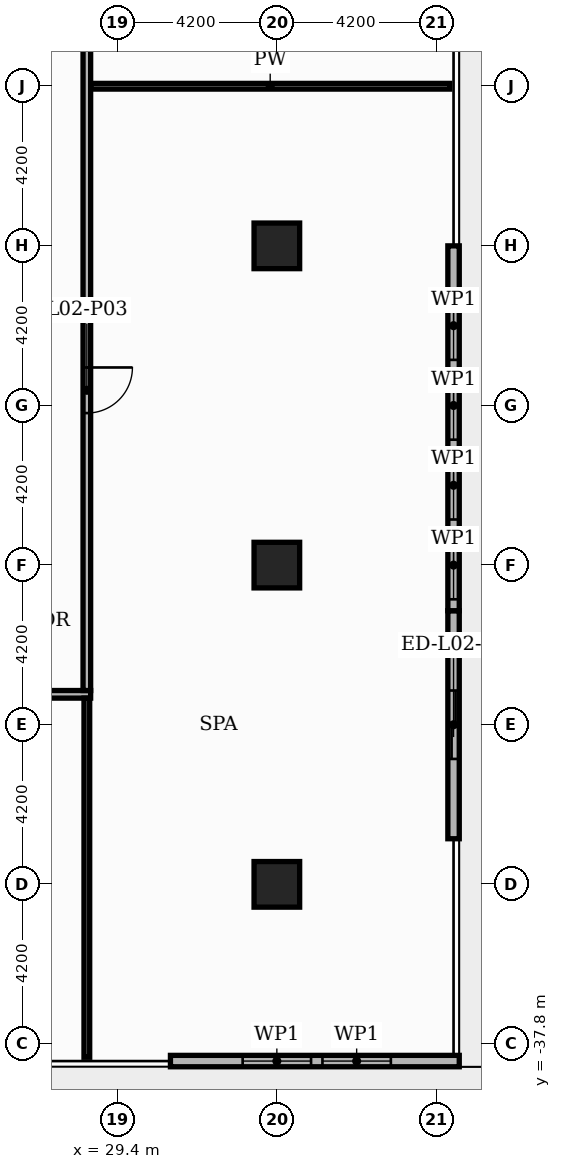
"""IFC4 building model, lengths in metres.
Left out: names, types, materials, properties, quantities, classifications, styles, units other than length and angle.
Written with IfcOpenShell. Run it as: python <this file> out.ifc"""

import sys

from ifc_helpers import new_model, si_unit, direction, frame, frame_2d, origin, origin_2d, place, context, subcontext, project, spatial, rectangle, extrude, element, fill, save


model = new_model("IFC4")
c1 = context("Model", 3, precision=1e-05, world=origin(), true_north=direction((0.0, 1.0)))
c2 = subcontext(c1, "Body", "Model", "MODEL_VIEW")
j1 = project(units=[si_unit("LENGTHUNIT", "METRE"), si_unit("PLANEANGLEUNIT", "RADIAN")], contexts=[c1])
p1 = place(None, origin())
s1 = spatial("IfcSite", under=j1, at=p1, CompositionType="ELEMENT")
p2 = place(p1, origin())
s2 = spatial("IfcBuilding", under=s1, at=p2, CompositionType="ELEMENT")
p3 = place(p2, frame((0.0, 0.0, 12.0)))
s3 = spatial("IfcBuildingStorey", under=s2, at=p3, CompositionType="ELEMENT", Elevation=12.0)
for number, where, z_axis, x_axis in (
    (1, (33.6, -16.8, 0.0), (0.0, 0.0, 1.0), (1.0, 0.0, 0.0)),
    (2, (33.6, -25.2, 0.0), (0.0, 0.0, 1.0), (1.0, 0.0, 0.0)),
    (3, (33.6, -33.6, 0.0), (0.0, 0.0, 1.0), (1.0, 0.0, 0.0)),
):
    element("IfcColumn", number, at=place(p3, frame(where, z_axis=z_axis, x_axis=x_axis)), inside=s3, PredefinedType="COLUMN", context=c2, shape_type="SweptSolid", body=[
        extrude(rectangle(XDim=1.2, YDim=1.2, at=origin_2d()), origin(), (0.0, 0.0, 1.0), 4.8),
    ])
p4 = place(p3, frame((30.8, -38.25, 0.0), z_axis=(0.0, 0.0, 1.0), x_axis=(1.0, 0.0, 0.0)))
e4 = element("IfcWall", 4, at=p4, inside=s3, PredefinedType="STANDARD", context=c2, shape_type="SweptSolid", body=[
    extrude(rectangle(XDim=7.6, YDim=0.3, at=frame_2d((3.8, 0.0))), origin(), (0.0, 0.0, 1.0), 4.38),
])
p5 = place(p4, frame((1.9, 0.0, 0.6)))
e5 = element("IfcOpeningElement", 5, at=p5, cuts=e4, PredefinedType="OPENING", context=c2, shape_type="SweptSolid", body=[
    extrude(rectangle(XDim=1.8, YDim=3.0, at=frame_2d((0.9, 1.5))), frame((0.0, 0.16, 0.0), z_axis=(0.0, -1.0, 0.0), x_axis=(1.0, 0.0, 0.0)), (0.0, 0.0, 1.0), 0.32),
])
p6 = place(p4, frame((4.0, 0.0, 0.6)))
e6 = element("IfcOpeningElement", 6, at=p6, cuts=e4, PredefinedType="OPENING", context=c2, shape_type="SweptSolid", body=[
    extrude(rectangle(XDim=1.8, YDim=3.0, at=frame_2d((0.9, 1.5))), frame((0.0, 0.16, 0.0), z_axis=(0.0, -1.0, 0.0), x_axis=(1.0, 0.0, 0.0)), (0.0, 0.0, 1.0), 0.32),
])
p7 = place(p3, frame((38.25, -32.4, 0.0), z_axis=(0.0, 0.0, 1.0), x_axis=(0.0, 1.0, 0.0)))
e7 = element("IfcWall", 7, at=p7, inside=s3, PredefinedType="STANDARD", context=c2, shape_type="SweptSolid", body=[
    extrude(rectangle(XDim=6.0, YDim=0.3, at=frame_2d((3.0, 0.0))), origin(), (0.0, 0.0, 1.0), 4.38),
])
p8 = place(p7, frame((2.1, 0.0, 0.0)))
e8 = element("IfcOpeningElement", 8, at=p8, cuts=e7, PredefinedType="OPENING", context=c2, shape_type="SweptSolid", body=[
    extrude(rectangle(XDim=1.8, YDim=2.4, at=frame_2d((0.9, 1.2))), frame((0.0, 0.16, 0.0), z_axis=(0.0, -1.0, 0.0), x_axis=(1.0, 0.0, 0.0)), (0.0, 0.0, 1.0), 0.32),
])
p9 = place(p3, frame((38.25, -26.4, 0.0), z_axis=(0.0, 0.0, 1.0), x_axis=(0.0, 1.0, 0.0)))
e9 = element("IfcWall", 9, at=p9, inside=s3, PredefinedType="STANDARD", context=c2, shape_type="SweptSolid", body=[
    extrude(rectangle(XDim=9.6, YDim=0.3, at=frame_2d((4.8, 0.0))), origin(), (0.0, 0.0, 1.0), 4.38),
])
p10 = place(p9, frame((0.3, 0.0, 0.6)))
e10 = element("IfcOpeningElement", 10, at=p10, cuts=e9, PredefinedType="OPENING", context=c2, shape_type="SweptSolid", body=[
    extrude(rectangle(XDim=1.8, YDim=3.0, at=frame_2d((0.9, 1.5))), frame((0.0, 0.16, 0.0), z_axis=(0.0, -1.0, 0.0), x_axis=(1.0, 0.0, 0.0)), (0.0, 0.0, 1.0), 0.32),
])
p11 = place(p9, frame((2.4, 0.0, 0.6)))
e11 = element("IfcOpeningElement", 11, at=p11, cuts=e9, PredefinedType="OPENING", context=c2, shape_type="SweptSolid", body=[
    extrude(rectangle(XDim=1.8, YDim=3.0, at=frame_2d((0.9, 1.5))), frame((0.0, 0.16, 0.0), z_axis=(0.0, -1.0, 0.0), x_axis=(1.0, 0.0, 0.0)), (0.0, 0.0, 1.0), 0.32),
])
p12 = place(p9, frame((4.5, 0.0, 0.6)))
e12 = element("IfcOpeningElement", 12, at=p12, cuts=e9, PredefinedType="OPENING", context=c2, shape_type="SweptSolid", body=[
    extrude(rectangle(XDim=1.8, YDim=3.0, at=frame_2d((0.9, 1.5))), frame((0.0, 0.16, 0.0), z_axis=(0.0, -1.0, 0.0), x_axis=(1.0, 0.0, 0.0)), (0.0, 0.0, 1.0), 0.32),
])
p13 = place(p9, frame((6.6, 0.0, 0.6)))
e13 = element("IfcOpeningElement", 13, at=p13, cuts=e9, PredefinedType="OPENING", context=c2, shape_type="SweptSolid", body=[
    extrude(rectangle(XDim=1.8, YDim=3.0, at=frame_2d((0.9, 1.5))), frame((0.0, 0.16, 0.0), z_axis=(0.0, -1.0, 0.0), x_axis=(1.0, 0.0, 0.0)), (0.0, 0.0, 1.0), 0.32),
])
p14 = place(p3, frame((-28.7, -28.6, 0.0), z_axis=(0.0, 0.0, 1.0), x_axis=(1.0, 0.0, 0.0)))
e14 = element("IfcWall", 14, at=p14, inside=s3, PredefinedType="PARTITIONING", context=c2, shape_type="SweptSolid", body=[
    extrude(rectangle(XDim=57.4, YDim=0.2, at=frame_2d((28.7, 0.0))), origin(), (0.0, 0.0, 1.0), 4.08),
])
p15 = place(p14, frame((13.8, 0.0, 0.0)))
e15 = element("IfcOpeningElement", 15, at=p15, cuts=e14, PredefinedType="OPENING", context=c2, shape_type="SweptSolid", body=[
    extrude(rectangle(XDim=1.2, YDim=2.2, at=frame_2d((0.6, 1.1))), frame((0.0, 0.11, 0.0), z_axis=(0.0, -1.0, 0.0), x_axis=(1.0, 0.0, 0.0)), (0.0, 0.0, 1.0), 0.22),
])
p16 = place(p14, frame((42.4, 0.0, 0.0)))
e16 = element("IfcOpeningElement", 16, at=p16, cuts=e14, PredefinedType="OPENING", context=c2, shape_type="SweptSolid", body=[
    extrude(rectangle(XDim=1.2, YDim=2.2, at=frame_2d((0.6, 1.1))), frame((0.0, 0.11, 0.0), z_axis=(0.0, -1.0, 0.0), x_axis=(1.0, 0.0, 0.0)), (0.0, 0.0, 1.0), 0.22),
])
p17 = place(p3, frame((28.7, -12.6, 0.0), z_axis=(0.0, 0.0, 1.0), x_axis=(1.0, 0.0, 0.0)))
e17 = element("IfcWall", 17, at=p17, inside=s3, PredefinedType="PARTITIONING", context=c2, shape_type="SweptSolid", body=[
    extrude(rectangle(XDim=9.45, YDim=0.15, at=frame_2d((4.725, 0.0))), origin(), (0.0, 0.0, 1.0), 4.08),
])
p18 = place(p3, frame((28.6, -38.15, 0.0), z_axis=(0.0, 0.0, 1.0), x_axis=(0.0, 1.0, 0.0)))
e18 = element("IfcWall", 18, at=p18, inside=s3, PredefinedType="PARTITIONING", context=c2, shape_type="SweptSolid", body=[
    extrude(rectangle(XDim=9.45, YDim=0.15, at=frame_2d((4.725, 0.0))), origin(), (0.0, 0.0, 1.0), 4.18),
])
p19 = place(p3, frame((28.6, -28.5, 0.0), z_axis=(0.0, 0.0, 1.0), x_axis=(0.0, 1.0, 0.0)))
e19 = element("IfcWall", 19, at=p19, inside=s3, PredefinedType="PARTITIONING", context=c2, shape_type="SweptSolid", body=[
    extrude(rectangle(XDim=57.0, YDim=0.2, at=frame_2d((28.5, 0.0))), origin(), (0.0, 0.0, 1.0), 4.18),
])
p20 = place(p19, frame((7.3, 0.0, 0.0)))
e20 = element("IfcOpeningElement", 20, at=p20, cuts=e19, PredefinedType="OPENING", context=c2, shape_type="SweptSolid", body=[
    extrude(rectangle(XDim=1.2, YDim=2.2, at=frame_2d((0.6, 1.1))), frame((0.0, 0.11, 0.0), z_axis=(0.0, -1.0, 0.0), x_axis=(1.0, 0.0, 0.0)), (0.0, 0.0, 1.0), 0.22),
])
p21 = place(p19, frame((21.6, 0.0, 0.0)))
e21 = element("IfcOpeningElement", 21, at=p21, cuts=e19, PredefinedType="OPENING", context=c2, shape_type="SweptSolid", body=[
    extrude(rectangle(XDim=1.2, YDim=2.2, at=frame_2d((0.6, 1.1))), frame((0.0, 0.11, 0.0), z_axis=(0.0, -1.0, 0.0), x_axis=(1.0, 0.0, 0.0)), (0.0, 0.0, 1.0), 0.22),
])
p22 = place(p19, frame((34.2, 0.0, 0.0)))
e22 = element("IfcOpeningElement", 22, at=p22, cuts=e19, PredefinedType="OPENING", context=c2, shape_type="SweptSolid", body=[
    extrude(rectangle(XDim=1.2, YDim=2.2, at=frame_2d((0.6, 1.1))), frame((0.0, 0.11, 0.0), z_axis=(0.0, -1.0, 0.0), x_axis=(1.0, 0.0, 0.0)), (0.0, 0.0, 1.0), 0.22),
])
p23 = place(p19, frame((46.8, 0.0, 0.0)))
e23 = element("IfcOpeningElement", 23, at=p23, cuts=e19, PredefinedType="OPENING", context=c2, shape_type="SweptSolid", body=[
    extrude(rectangle(XDim=1.2, YDim=2.2, at=frame_2d((0.6, 1.1))), frame((0.0, 0.11, 0.0), z_axis=(0.0, -1.0, 0.0), x_axis=(1.0, 0.0, 0.0)), (0.0, 0.0, 1.0), 0.22),
])
p24 = place(p19, frame((54.8, 0.0, 0.0)))
e24 = element("IfcOpeningElement", 24, at=p24, cuts=e19, PredefinedType="OPENING", context=c2, shape_type="SweptSolid", body=[
    extrude(rectangle(XDim=1.2, YDim=2.2, at=frame_2d((0.6, 1.1))), frame((0.0, 0.11, 0.0), z_axis=(0.0, -1.0, 0.0), x_axis=(1.0, 0.0, 0.0)), (0.0, 0.0, 1.0), 0.22),
])
p25 = place(p5, origin())
e25 = element("IfcWindow", 25, at=p25, inside=s3, PartitioningType="SINGLE_PANEL", PredefinedType="WINDOW", context=c2, shape_type="SweptSolid", body=[
    extrude(rectangle(XDim=1.8, YDim=3.0, at=frame_2d((0.9, 1.5))), frame((0.0, 0.03, 0.0), z_axis=(0.0, -1.0, 0.0), x_axis=(1.0, 0.0, 0.0)), (0.0, 0.0, 1.0), 0.06),
])
fill(e5, e25)
p26 = place(p6, origin())
e26 = element("IfcWindow", 26, at=p26, inside=s3, PartitioningType="SINGLE_PANEL", PredefinedType="WINDOW", context=c2, shape_type="SweptSolid", body=[
    extrude(rectangle(XDim=1.8, YDim=3.0, at=frame_2d((0.9, 1.5))), frame((0.0, 0.03, 0.0), z_axis=(0.0, -1.0, 0.0), x_axis=(1.0, 0.0, 0.0)), (0.0, 0.0, 1.0), 0.06),
])
fill(e6, e26)
p27 = place(p8, origin())
e27 = element("IfcDoor", 27, at=p27, inside=s3, OperationType="SLIDING_TO_LEFT", PredefinedType="DOOR", context=c2, shape_type="SweptSolid", body=[
    extrude(rectangle(XDim=1.8, YDim=2.4, at=frame_2d((0.9, 1.2))), frame((0.0, 0.025, 0.0), z_axis=(0.0, -1.0, 0.0), x_axis=(1.0, 0.0, 0.0)), (0.0, 0.0, 1.0), 0.05),
])
fill(e8, e27)
p28 = place(p10, origin())
e28 = element("IfcWindow", 28, at=p28, inside=s3, PartitioningType="SINGLE_PANEL", PredefinedType="WINDOW", context=c2, shape_type="SweptSolid", body=[
    extrude(rectangle(XDim=1.8, YDim=3.0, at=frame_2d((0.9, 1.5))), frame((0.0, 0.03, 0.0), z_axis=(0.0, -1.0, 0.0), x_axis=(1.0, 0.0, 0.0)), (0.0, 0.0, 1.0), 0.06),
])
fill(e10, e28)
p29 = place(p11, origin())
e29 = element("IfcWindow", 29, at=p29, inside=s3, PartitioningType="SINGLE_PANEL", PredefinedType="WINDOW", context=c2, shape_type="SweptSolid", body=[
    extrude(rectangle(XDim=1.8, YDim=3.0, at=frame_2d((0.9, 1.5))), frame((0.0, 0.03, 0.0), z_axis=(0.0, -1.0, 0.0), x_axis=(1.0, 0.0, 0.0)), (0.0, 0.0, 1.0), 0.06),
])
fill(e11, e29)
p30 = place(p12, origin())
e30 = element("IfcWindow", 30, at=p30, inside=s3, PartitioningType="SINGLE_PANEL", PredefinedType="WINDOW", context=c2, shape_type="SweptSolid", body=[
    extrude(rectangle(XDim=1.8, YDim=3.0, at=frame_2d((0.9, 1.5))), frame((0.0, 0.03, 0.0), z_axis=(0.0, -1.0, 0.0), x_axis=(1.0, 0.0, 0.0)), (0.0, 0.0, 1.0), 0.06),
])
fill(e12, e30)
p31 = place(p13, origin())
e31 = element("IfcWindow", 31, at=p31, inside=s3, PartitioningType="SINGLE_PANEL", PredefinedType="WINDOW", context=c2, shape_type="SweptSolid", body=[
    extrude(rectangle(XDim=1.8, YDim=3.0, at=frame_2d((0.9, 1.5))), frame((0.0, 0.03, 0.0), z_axis=(0.0, -1.0, 0.0), x_axis=(1.0, 0.0, 0.0)), (0.0, 0.0, 1.0), 0.06),
])
fill(e13, e31)
p32 = place(p20, origin())
e32 = element("IfcDoor", 32, at=p32, inside=s3, OperationType="SINGLE_SWING_RIGHT", PredefinedType="DOOR", context=c2, shape_type="SweptSolid", body=[
    extrude(rectangle(XDim=1.2, YDim=2.2, at=frame_2d((0.6, 1.1))), frame((0.0, 0.025, 0.0), z_axis=(0.0, -1.0, 0.0), x_axis=(1.0, 0.0, 0.0)), (0.0, 0.0, 1.0), 0.05),
])
fill(e20, e32)
save(model, sys.argv[1])
